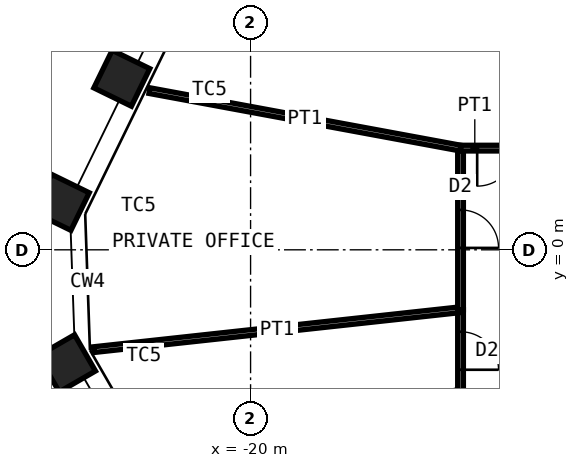
"""IFC4 building model, lengths in metres.
Left out: names, types, materials, properties, quantities, classifications, styles, units other than length and angle.
Written with IfcOpenShell. Run it as: python <this file> out.ifc"""

import sys

from ifc_helpers import new_model, si_unit, direction, frame, frame_2d, origin, origin_2d, place, context, subcontext, project, spatial, rectangle, hollow_rectangle, extrude, element, fill, save


model = new_model("IFC4")
c1 = context("Model", 3, precision=1e-05, world=origin(), true_north=direction((0.0, 1.0)))
c2 = subcontext(c1, "Body", "Model", "MODEL_VIEW")
j1 = project(units=[si_unit("LENGTHUNIT", "METRE"), si_unit("PLANEANGLEUNIT", "RADIAN")], contexts=[c1])
p1 = place(None, origin())
s1 = spatial("IfcSite", under=j1, at=p1, CompositionType="ELEMENT")
p2 = place(p1, origin())
s2 = spatial("IfcBuilding", under=s1, at=p2, CompositionType="ELEMENT")
p3 = place(p2, frame((0.0, 0.0, 209.8)))
s3 = spatial("IfcBuildingStorey", under=s2, at=p3, CompositionType="ELEMENT", Elevation=209.8)
for number, where, z_axis, x_axis in (
    (1, (-24.833, -2.988, 0.0), (0.0, 0.0, 1.0), (0.5, -0.866, 0.0)),
    (2, (-24.981, 1.248, 0.0), (0.0, 0.0, 1.0), (-0.438, -0.899, 0.0)),
    (3, (-23.388, 4.514, 0.0), (0.0, 0.0, 1.0), (-0.438, -0.899, 0.0)),
):
    element("IfcColumn", number, at=place(p3, frame(where, z_axis=z_axis, x_axis=x_axis)), inside=s3, PredefinedType="COLUMN", context=c2, shape_type="SweptSolid", body=[
        extrude(hollow_rectangle(XDim=1.1, YDim=1.1, WallThickness=0.07, at=origin_2d()), origin(), (0.0, 0.0, 1.0), 4.2),
    ])
p4 = place(p3, frame((-14.475, -3.736, 0.0), z_axis=(0.0, 0.0, 1.0), x_axis=(0.0, 1.0, 0.0)))
e4 = element("IfcWall", 4, at=p4, inside=s3, PredefinedType="PARTITIONING", context=c2, shape_type="SweptSolid", body=[
    extrude(rectangle(XDim=2.16, YDim=0.15, at=frame_2d((1.08, 0.0))), origin(), (0.0, 0.0, 1.0), 4.03),
])
p5 = place(p4, frame((0.58, 0.0, 0.0)))
e5 = element("IfcOpeningElement", 5, at=p5, cuts=e4, PredefinedType="OPENING", context=c2, shape_type="SweptSolid", body=[
    extrude(rectangle(XDim=1.0, YDim=2.4, at=frame_2d((0.5, 1.2))), frame((0.0, 0.085, 0.0), z_axis=(0.0, -1.0, 0.0), x_axis=(1.0, 0.0, 0.0)), (0.0, 0.0, 1.0), 0.17),
])
p6 = place(p3, frame((-24.128, -2.627, 0.0), z_axis=(0.0, 0.0, 1.0), x_axis=(0.994126892449, 0.108220708326, 0.0)))
e6 = element("IfcWall", 6, at=p6, inside=s3, PredefinedType="PARTITIONING", context=c2, shape_type="SweptSolid", body=[
    extrude(rectangle(XDim=9.71, YDim=0.15, at=frame_2d((4.855, 0.0))), origin(), (0.0, 0.0, 1.0), 2.93),
])
p7 = place(p3, frame((-14.475, -1.576, 0.0), z_axis=(0.0, 0.0, 1.0), x_axis=(0.0, 1.0, 0.0)))
e7 = element("IfcWall", 7, at=p7, inside=s3, PredefinedType="PARTITIONING", context=c2, shape_type="SweptSolid", body=[
    extrude(rectangle(XDim=4.252, YDim=0.15, at=frame_2d((2.126, 0.0))), origin(), (0.0, 0.0, 1.0), 4.03),
])
p8 = place(p7, frame((1.626, 0.0, 0.0)))
e8 = element("IfcOpeningElement", 8, at=p8, cuts=e7, PredefinedType="OPENING", context=c2, shape_type="SweptSolid", body=[
    extrude(rectangle(XDim=1.0, YDim=2.4, at=frame_2d((0.5, 1.2))), frame((0.0, 0.085, 0.0), z_axis=(0.0, -1.0, 0.0), x_axis=(1.0, 0.0, 0.0)), (0.0, 0.0, 1.0), 0.17),
])
p9 = place(p3, frame((-22.661, 4.189, 0.0), z_axis=(0.0, 0.0, 1.0), x_axis=(0.983345347199, -0.181746879316, 0.0)))
e9 = element("IfcWall", 9, at=p9, inside=s3, PredefinedType="PARTITIONING", context=c2, shape_type="SweptSolid", body=[
    extrude(rectangle(XDim=8.324, YDim=0.15, at=frame_2d((4.162, 0.0))), origin(), (0.0, 0.0, 1.0), 3.43),
])
p10 = place(p3, frame((-14.475, 2.676, 0.0), z_axis=(0.0, 0.0, 1.0), x_axis=(1.0, 0.0, 0.0)))
e10 = element("IfcWall", 10, at=p10, inside=s3, PredefinedType="PARTITIONING", context=c2, shape_type="SweptSolid", body=[
    extrude(rectangle(XDim=1.875, YDim=0.15, at=frame_2d((0.938, 0.0))), origin(), (0.0, 0.0, 1.0), 3.43),
])
p11 = place(p10, frame((0.438, 0.0, 0.0)))
e11 = element("IfcOpeningElement", 11, at=p11, cuts=e10, PredefinedType="OPENING", context=c2, shape_type="SweptSolid", body=[
    extrude(rectangle(XDim=1.0, YDim=2.4, at=frame_2d((0.5, 1.2))), frame((0.0, 0.085, 0.0), z_axis=(0.0, -1.0, 0.0), x_axis=(1.0, 0.0, 0.0)), (0.0, 0.0, 1.0), 0.17),
])
p12 = place(p5, origin())
e12 = element("IfcDoor", 12, at=p12, inside=s3, OperationType="SINGLE_SWING_LEFT", PredefinedType="DOOR", context=c2, shape_type="SweptSolid", body=[
    extrude(rectangle(XDim=1.0, YDim=2.4, at=frame_2d((0.5, 1.2))), frame((0.0, 0.025, 0.0), z_axis=(0.0, -1.0, 0.0), x_axis=(1.0, 0.0, 0.0)), (0.0, 0.0, 1.0), 0.05),
])
fill(e5, e12)
p13 = place(p8, origin())
e13 = element("IfcDoor", 13, at=p13, inside=s3, OperationType="SINGLE_SWING_LEFT", PredefinedType="DOOR", context=c2, shape_type="SweptSolid", body=[
    extrude(rectangle(XDim=1.0, YDim=2.4, at=frame_2d((0.5, 1.2))), frame((0.0, 0.025, 0.0), z_axis=(0.0, -1.0, 0.0), x_axis=(1.0, 0.0, 0.0)), (0.0, 0.0, 1.0), 0.05),
])
fill(e8, e13)
p14 = place(p11, origin())
e14 = element("IfcDoor", 14, at=p14, inside=s3, OperationType="SINGLE_SWING_LEFT", PredefinedType="DOOR", context=c2, shape_type="SweptSolid", body=[
    extrude(rectangle(XDim=1.0, YDim=2.4, at=frame_2d((0.5, 1.2))), frame((0.0, 0.025, 0.0), z_axis=(0.0, -1.0, 0.0), x_axis=(1.0, 0.0, 0.0)), (0.0, 0.0, 1.0), 0.05),
])
fill(e11, e14)
save(model, sys.argv[1])
